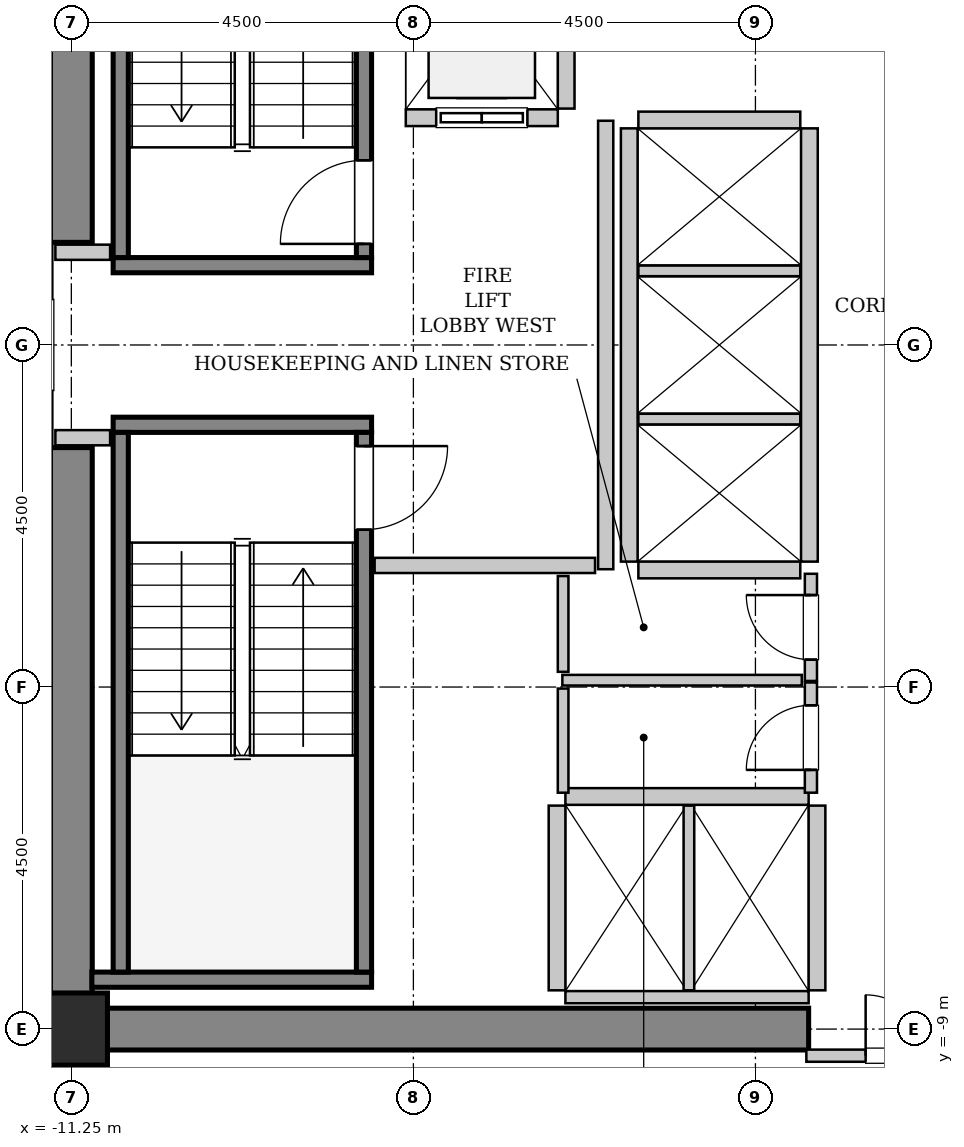
"""IFC4 building model, lengths in metres.
Left out: names, types, materials, properties, quantities, classifications, styles, units other than length and angle.
Written with IfcOpenShell. Run it as: python <this file> out.ifc"""

import sys

from ifc_helpers import new_model, si_unit, direction, frame, frame_2d, origin, origin_2d, place, context, subcontext, project, spatial, rectangle, hollow_rectangle, extrude, source, transform, mapped, element, fill, save


model = new_model("IFC4")
c1 = context("Model", 3, precision=1e-05, world=origin(), true_north=direction((0.0, 1.0)))
c2 = subcontext(c1, "Body", "Model", "MODEL_VIEW")
j1 = project(units=[si_unit("LENGTHUNIT", "METRE"), si_unit("PLANEANGLEUNIT", "RADIAN")], contexts=[c1])
p1 = place(None, origin())
s1 = spatial("IfcSite", under=j1, at=p1, CompositionType="ELEMENT")
p2 = place(p1, origin())
s2 = spatial("IfcBuilding", under=s1, at=p2, CompositionType="ELEMENT")
p3 = place(p2, frame((0.0, 0.0, 121.2)))
s3 = spatial("IfcBuildingStorey", under=s2, at=p3, CompositionType="ELEMENT", Elevation=121.2)
m1 = source(origin(), c2, "Body", "SweptSolid", [
    extrude(rectangle(XDim=9.975, YDim=0.55, at=frame_2d((4.987, 0.0))), origin(), (0.0, 0.0, 1.0), 3.8),
])
p4 = place(p3, frame((-11.525, -9.0, 0.0), z_axis=(0.0, 0.0, 1.0), x_axis=(1.0, 0.0, 0.0)))
e1 = element("IfcWall", 1, at=p4, inside=s3, PredefinedType="SHEAR", context=c2, shape_type="MappedRepresentation", body=[
    mapped(m1, transform((0.0, 0.0, 0.0), x_axis=(1.0, 0.0, 0.0), y_axis=(0.0, 1.0, 0.0), z_axis=(0.0, 0.0, 1.0), scale=1.0)),
])
m2 = source(origin(), c2, "Body", "SweptSolid", [
    extrude(rectangle(XDim=7.375, YDim=0.55, at=frame_2d((3.688, 0.0))), origin(), (0.0, 0.0, 1.0), 3.8),
])
for number, where, z_axis, x_axis in (
    (2, (-11.25, -8.725, 0.0), (0.0, 0.0, 1.0), (0.0, 1.0, 0.0)),
    (3, (-11.25, 1.35, 0.0), (0.0, 0.0, 1.0), (0.0, 1.0, 0.0)),
):
    element("IfcWall", number, at=place(p3, frame(where, z_axis=z_axis, x_axis=x_axis)), inside=s3, PredefinedType="SHEAR", context=c2, shape_type="MappedRepresentation", body=[
        mapped(m2, transform((0.0, 0.0, 0.0), x_axis=(1.0, 0.0, 0.0), y_axis=(0.0, 1.0, 0.0), z_axis=(0.0, 0.0, 1.0), scale=1.0)),
    ])
m3 = source(origin(), c2, "Body", "SweptSolid", [
    extrude(hollow_rectangle(XDim=0.95, YDim=0.95, WallThickness=0.045, InnerFilletRadius=0.045, OuterFilletRadius=0.09, at=origin_2d()), origin(), (0.0, 0.0, 1.0), 3.8),
])
p5 = place(p3, frame((-11.25, -9.0, 0.0), z_axis=(0.0, 0.0, 1.0), x_axis=(1.0, 0.0, 0.0)))
e4 = element("IfcColumn", 4, at=p5, inside=s3, PredefinedType="COLUMN", context=c2, shape_type="MappedRepresentation", body=[
    mapped(m3, transform((0.0, 0.0, 0.0), x_axis=(1.0, 0.0, 0.0), y_axis=(0.0, 1.0, 0.0), z_axis=(0.0, 0.0, 1.0), scale=1.0)),
])
m4 = source(origin(), c2, "Body", "SweptSolid", [
    extrude(rectangle(XDim=3.4, YDim=0.2, at=frame_2d((1.7, 0.0))), origin(), (0.0, 0.0, 1.0), 3.8),
])
p6 = place(p3, frame((-7.3, 1.05, 0.0), z_axis=(0.0, 0.0, 1.0), x_axis=(-1.0, 0.0, 0.0)))
e5 = element("IfcWall", 5, at=p6, inside=s3, PredefinedType="SOLIDWALL", context=c2, shape_type="MappedRepresentation", body=[
    mapped(m4, transform((0.0, 0.0, 0.0), x_axis=(1.0, 0.0, 0.0), y_axis=(0.0, 1.0, 0.0), z_axis=(0.0, 0.0, 1.0), scale=1.0)),
])
m5 = source(origin(), c2, "Body", "SweptSolid", [
    extrude(rectangle(XDim=7.1, YDim=0.2, at=frame_2d((3.55, 0.0))), origin(), (0.0, 0.0, 1.0), 3.8),
])
p7 = place(p3, frame((-7.4, 1.15, 0.0), z_axis=(0.0, 0.0, 1.0), x_axis=(0.0, 1.0, 0.0)))
e6 = element("IfcWall", 6, at=p7, inside=s3, PredefinedType="SOLIDWALL", context=c2, shape_type="MappedRepresentation", body=[
    mapped(m5, transform((0.0, 0.0, 0.0), x_axis=(1.0, 0.0, 0.0), y_axis=(0.0, 1.0, 0.0), z_axis=(0.0, 0.0, 1.0), scale=1.0)),
])
p8 = place(p7, frame((0.18, 0.0, 0.0)))
e7 = element("IfcOpeningElement", 7, at=p8, cuts=e6, PredefinedType="OPENING", context=c2, shape_type="SweptSolid", body=[
    extrude(rectangle(XDim=1.1, YDim=2.15, at=frame_2d((0.55, 1.075))), frame((0.0, 0.11, 0.0), z_axis=(0.0, -1.0, 0.0), x_axis=(1.0, 0.0, 0.0)), (0.0, 0.0, 1.0), 0.22),
])
p9 = place(p3, frame((-10.6, 1.15, 0.0), z_axis=(0.0, 0.0, 1.0), x_axis=(0.0, 1.0, 0.0)))
e8 = element("IfcWall", 8, at=p9, inside=s3, PredefinedType="SOLIDWALL", context=c2, shape_type="MappedRepresentation", body=[
    mapped(m5, transform((0.0, 0.0, 0.0), x_axis=(1.0, 0.0, 0.0), y_axis=(0.0, 1.0, 0.0), z_axis=(0.0, 0.0, 1.0), scale=1.0)),
])
p10 = place(p3, frame((-10.7, -1.05, 0.0), z_axis=(0.0, 0.0, 1.0), x_axis=(1.0, 0.0, 0.0)))
e9 = element("IfcWall", 9, at=p10, inside=s3, PredefinedType="SOLIDWALL", context=c2, shape_type="MappedRepresentation", body=[
    mapped(m4, transform((0.0, 0.0, 0.0), x_axis=(1.0, 0.0, 0.0), y_axis=(0.0, 1.0, 0.0), z_axis=(0.0, 0.0, 1.0), scale=1.0)),
])
m6 = source(origin(), c2, "Body", "SweptSolid", [
    extrude(rectangle(XDim=3.68, YDim=0.2, at=frame_2d((1.84, 0.0))), origin(), (0.0, 0.0, 1.0), 3.8),
])
p11 = place(p3, frame((-10.98, -8.35, 0.0), z_axis=(0.0, 0.0, 1.0), x_axis=(1.0, 0.0, 0.0)))
e10 = element("IfcWall", 10, at=p11, inside=s3, PredefinedType="SOLIDWALL", context=c2, shape_type="MappedRepresentation", body=[
    mapped(m6, transform((0.0, 0.0, 0.0), x_axis=(1.0, 0.0, 0.0), y_axis=(0.0, 1.0, 0.0), z_axis=(0.0, 0.0, 1.0), scale=1.0)),
])
p12 = place(p3, frame((-10.6, -1.15, 0.0), z_axis=(0.0, 0.0, 1.0), x_axis=(0.0, -1.0, 0.0)))
e11 = element("IfcWall", 11, at=p12, inside=s3, PredefinedType="SOLIDWALL", context=c2, shape_type="MappedRepresentation", body=[
    mapped(m5, transform((0.0, 0.0, 0.0), x_axis=(1.0, 0.0, 0.0), y_axis=(0.0, 1.0, 0.0), z_axis=(0.0, 0.0, 1.0), scale=1.0)),
])
p13 = place(p3, frame((-7.4, -1.15, 0.0), z_axis=(0.0, 0.0, 1.0), x_axis=(0.0, -1.0, 0.0)))
e12 = element("IfcWall", 12, at=p13, inside=s3, PredefinedType="SOLIDWALL", context=c2, shape_type="MappedRepresentation", body=[
    mapped(m5, transform((0.0, 0.0, 0.0), x_axis=(1.0, 0.0, 0.0), y_axis=(0.0, 1.0, 0.0), z_axis=(0.0, 0.0, 1.0), scale=1.0)),
])
p14 = place(p13, frame((0.18, 0.0, 0.0)))
e13 = element("IfcOpeningElement", 13, at=p14, cuts=e12, PredefinedType="OPENING", context=c2, shape_type="SweptSolid", body=[
    extrude(rectangle(XDim=1.1, YDim=2.15, at=frame_2d((0.55, 1.075))), frame((0.0, 0.11, 0.0), z_axis=(0.0, -1.0, 0.0), x_axis=(1.0, 0.0, 0.0)), (0.0, 0.0, 1.0), 0.22),
])
m7 = source(origin(), c2, "Body", "SweptSolid", [
    extrude(rectangle(XDim=2.0, YDim=0.22, at=frame_2d((1.0, 0.0))), origin(), (0.0, 0.0, 1.0), 3.535),
])
p15 = place(p3, frame((-6.85, 2.99, 0.0), z_axis=(0.0, 0.0, 1.0), x_axis=(1.0, 0.0, 0.0)))
e14 = element("IfcWall", 14, at=p15, inside=s3, PredefinedType="SOLIDWALL", context=c2, shape_type="MappedRepresentation", body=[
    mapped(m7, transform((0.0, 0.0, 0.0), x_axis=(1.0, 0.0, 0.0), y_axis=(0.0, 1.0, 0.0), z_axis=(0.0, 0.0, 1.0), scale=1.0)),
])
p16 = place(p15, frame((0.4, 0.0, 0.0)))
e15 = element("IfcOpeningElement", 15, at=p16, cuts=e14, PredefinedType="OPENING", context=c2, shape_type="SweptSolid", body=[
    extrude(rectangle(XDim=1.2, YDim=2.2, at=frame_2d((0.6, 1.1))), frame((0.0, 0.12, 0.0), z_axis=(0.0, -1.0, 0.0), x_axis=(1.0, 0.0, 0.0)), (0.0, 0.0, 1.0), 0.24),
])
m8 = source(origin(), c2, "Body", "SweptSolid", [
    extrude(rectangle(XDim=2.68, YDim=0.22, at=frame_2d((1.34, 0.0))), origin(), (0.0, 0.0, 1.0), 3.535),
])
p17 = place(p3, frame((-4.74, 3.11, 0.0), z_axis=(0.0, 0.0, 1.0), x_axis=(0.0, 1.0, 0.0)))
e16 = element("IfcWall", 16, at=p17, inside=s3, PredefinedType="SOLIDWALL", context=c2, shape_type="MappedRepresentation", body=[
    mapped(m8, transform((0.0, 0.0, 0.0), x_axis=(1.0, 0.0, 0.0), y_axis=(0.0, 1.0, 0.0), z_axis=(0.0, 0.0, 1.0), scale=1.0)),
])
m9 = source(origin(), c2, "Body", "SweptSolid", [
    extrude(rectangle(XDim=3.2, YDim=0.22, at=frame_2d((1.6, 0.0))), origin(), (0.0, 0.0, 1.0), 3.535),
])
p18 = place(p3, frame((-1.55, -5.94, 0.0), z_axis=(0.0, 0.0, 1.0), x_axis=(-1.0, 0.0, 0.0)))
e17 = element("IfcWall", 17, at=p18, inside=s3, PredefinedType="SOLIDWALL", context=c2, shape_type="MappedRepresentation", body=[
    mapped(m9, transform((0.0, 0.0, 0.0), x_axis=(1.0, 0.0, 0.0), y_axis=(0.0, 1.0, 0.0), z_axis=(0.0, 0.0, 1.0), scale=1.0)),
])
m10 = source(origin(), c2, "Body", "SweptSolid", [
    extrude(rectangle(XDim=3.2, YDim=0.16, at=frame_2d((1.6, 0.0))), origin(), (0.0, 0.0, 1.0), 2.425),
])
p19 = place(p3, frame((-4.75, -8.58, 0.0), z_axis=(0.0, 0.0, 1.0), x_axis=(1.0, 0.0, 0.0)))
e18 = element("IfcWall", 18, at=p19, inside=s3, PredefinedType="PARTITIONING", context=c2, shape_type="MappedRepresentation", body=[
    mapped(m10, transform((0.0, 0.0, 0.0), x_axis=(1.0, 0.0, 0.0), y_axis=(0.0, 1.0, 0.0), z_axis=(0.0, 0.0, 1.0), scale=1.0)),
])
m11 = source(origin(), c2, "Body", "SweptSolid", [
    extrude(rectangle(XDim=2.43, YDim=0.22, at=frame_2d((1.215, 0.0))), origin(), (0.0, 0.0, 1.0), 3.535),
])
p20 = place(p3, frame((-4.86, -6.06, 0.0), z_axis=(0.0, 0.0, 1.0), x_axis=(0.0, -1.0, 0.0)))
e19 = element("IfcWall", 19, at=p20, inside=s3, PredefinedType="SOLIDWALL", context=c2, shape_type="MappedRepresentation", body=[
    mapped(m11, transform((0.0, 0.0, 0.0), x_axis=(1.0, 0.0, 0.0), y_axis=(0.0, 1.0, 0.0), z_axis=(0.0, 0.0, 1.0), scale=1.0)),
])
m12 = source(origin(), c2, "Body", "SweptSolid", [
    extrude(rectangle(XDim=2.43, YDim=0.14, at=frame_2d((1.215, 0.0))), origin(), (0.0, 0.0, 1.0), 3.535),
])
p21 = place(p3, frame((-3.125, -8.49, 0.0), z_axis=(0.0, 0.0, 1.0), x_axis=(0.0, 1.0, 0.0)))
e20 = element("IfcWall", 20, at=p21, inside=s3, PredefinedType="PARTITIONING", context=c2, shape_type="MappedRepresentation", body=[
    mapped(m12, transform((0.0, 0.0, 0.0), x_axis=(1.0, 0.0, 0.0), y_axis=(0.0, 1.0, 0.0), z_axis=(0.0, 0.0, 1.0), scale=1.0)),
])
p22 = place(p3, frame((-1.44, -8.49, 0.0), z_axis=(0.0, 0.0, 1.0), x_axis=(0.0, 1.0, 0.0)))
e21 = element("IfcWall", 21, at=p22, inside=s3, PredefinedType="SOLIDWALL", context=c2, shape_type="MappedRepresentation", body=[
    mapped(m11, transform((0.0, 0.0, 0.0), x_axis=(1.0, 0.0, 0.0), y_axis=(0.0, 1.0, 0.0), z_axis=(0.0, 0.0, 1.0), scale=1.0)),
])
m13 = source(origin(), c2, "Body", "SweptSolid", [
    extrude(rectangle(XDim=5.7, YDim=0.22, at=frame_2d((2.85, 0.0))), origin(), (0.0, 0.0, 1.0), 3.535),
])
for number, where, z_axis, x_axis in (
    (22, (-1.54, -2.85, 0.0), (0.0, 0.0, 1.0), (0.0, 1.0, 0.0)),
    (23, (-3.91, 2.85, 0.0), (0.0, 0.0, 1.0), (0.0, -1.0, 0.0)),
):
    element("IfcWall", number, at=place(p3, frame(where, z_axis=z_axis, x_axis=x_axis)), inside=s3, PredefinedType="SOLIDWALL", context=c2, shape_type="MappedRepresentation", body=[
        mapped(m13, transform((0.0, 0.0, 0.0), x_axis=(1.0, 0.0, 0.0), y_axis=(0.0, 1.0, 0.0), z_axis=(0.0, 0.0, 1.0), scale=1.0)),
    ])
m14 = source(origin(), c2, "Body", "SweptSolid", [
    extrude(rectangle(XDim=2.13, YDim=0.22, at=frame_2d((1.065, 0.0))), origin(), (0.0, 0.0, 1.0), 3.535),
])
p23 = place(p3, frame((-3.79, -2.96, 0.0), z_axis=(0.0, 0.0, 1.0), x_axis=(1.0, 0.0, 0.0)))
e24 = element("IfcWall", 24, at=p23, inside=s3, PredefinedType="SOLIDWALL", context=c2, shape_type="MappedRepresentation", body=[
    mapped(m14, transform((0.0, 0.0, 0.0), x_axis=(1.0, 0.0, 0.0), y_axis=(0.0, 1.0, 0.0), z_axis=(0.0, 0.0, 1.0), scale=1.0)),
])
m15 = source(origin(), c2, "Body", "SweptSolid", [
    extrude(rectangle(XDim=2.13, YDim=0.14, at=frame_2d((1.065, 0.0))), origin(), (0.0, 0.0, 1.0), 3.535),
])
for number, where, z_axis, x_axis in (
    (25, (-3.79, -0.975, 0.0), (0.0, 0.0, 1.0), (1.0, 0.0, 0.0)),
    (26, (-3.79, 0.975, 0.0), (0.0, 0.0, 1.0), (1.0, 0.0, 0.0)),
):
    element("IfcWall", number, at=place(p3, frame(where, z_axis=z_axis, x_axis=x_axis)), inside=s3, PredefinedType="PARTITIONING", context=c2, shape_type="MappedRepresentation", body=[
        mapped(m15, transform((0.0, 0.0, 0.0), x_axis=(1.0, 0.0, 0.0), y_axis=(0.0, 1.0, 0.0), z_axis=(0.0, 0.0, 1.0), scale=1.0)),
    ])
p24 = place(p3, frame((-1.66, 2.96, 0.0), z_axis=(0.0, 0.0, 1.0), x_axis=(-1.0, 0.0, 0.0)))
e27 = element("IfcWall", 27, at=p24, inside=s3, PredefinedType="SOLIDWALL", context=c2, shape_type="MappedRepresentation", body=[
    mapped(m14, transform((0.0, 0.0, 0.0), x_axis=(1.0, 0.0, 0.0), y_axis=(0.0, 1.0, 0.0), z_axis=(0.0, 0.0, 1.0), scale=1.0)),
])
m16 = source(origin(), c2, "Body", "SweptSolid", [
    extrude(rectangle(XDim=5.9, YDim=0.2, at=frame_2d((2.95, 0.0))), origin(), (0.0, 0.0, 1.0), 3.535),
])
p25 = place(p3, frame((-4.22, -2.95, 0.0), z_axis=(0.0, 0.0, 1.0), x_axis=(0.0, 1.0, 0.0)))
e28 = element("IfcWall", 28, at=p25, inside=s3, PredefinedType="PARTITIONING", context=c2, shape_type="MappedRepresentation", body=[
    mapped(m16, transform((0.0, 0.0, 0.0), x_axis=(1.0, 0.0, 0.0), y_axis=(0.0, 1.0, 0.0), z_axis=(0.0, 0.0, 1.0), scale=1.0)),
])
m17 = source(origin(), c2, "Body", "SweptSolid", [
    extrude(rectangle(XDim=2.9, YDim=0.2, at=frame_2d((1.45, 0.0))), origin(), (0.0, 0.0, 1.0), 3.535),
])
p26 = place(p3, frame((-7.26, -2.9, 0.0), z_axis=(0.0, 0.0, 1.0), x_axis=(1.0, 0.0, 0.0)))
e29 = element("IfcWall", 29, at=p26, inside=s3, PredefinedType="PARTITIONING", context=c2, shape_type="MappedRepresentation", body=[
    mapped(m17, transform((0.0, 0.0, 0.0), x_axis=(1.0, 0.0, 0.0), y_axis=(0.0, 1.0, 0.0), z_axis=(0.0, 0.0, 1.0), scale=1.0)),
])
m18 = source(origin(), c2, "Body", "SweptSolid", [
    extrude(rectangle(XDim=0.72, YDim=0.2, at=frame_2d((0.36, 0.0))), origin(), (0.0, 0.0, 1.0), 3.535),
])
for number, where, z_axis, x_axis in (
    (30, (-11.46, 1.22, 0.0), (0.0, 0.0, 1.0), (1.0, 0.0, 0.0)),
    (31, (-11.46, -1.22, 0.0), (0.0, 0.0, 1.0), (1.0, 0.0, 0.0)),
):
    element("IfcWall", number, at=place(p3, frame(where, z_axis=z_axis, x_axis=x_axis)), inside=s3, PredefinedType="PARTITIONING", context=c2, shape_type="MappedRepresentation", body=[
        mapped(m18, transform((0.0, 0.0, 0.0), x_axis=(1.0, 0.0, 0.0), y_axis=(0.0, 1.0, 0.0), z_axis=(0.0, 0.0, 1.0), scale=1.0)),
    ])
m19 = source(origin(), c2, "Body", "SweptSolid", [
    extrude(rectangle(XDim=3.16, YDim=0.16, at=frame_2d((1.58, 0.0))), origin(), (0.0, 0.0, 1.0), 2.425),
])
p27 = place(p3, frame((-1.58, -9.35, 0.0), z_axis=(0.0, 0.0, 1.0), x_axis=(1.0, 0.0, 0.0)))
e32 = element("IfcWall", 32, at=p27, inside=s3, PredefinedType="PARTITIONING", context=c2, shape_type="MappedRepresentation", body=[
    mapped(m19, transform((0.0, 0.0, 0.0), x_axis=(1.0, 0.0, 0.0), y_axis=(0.0, 1.0, 0.0), z_axis=(0.0, 0.0, 1.0), scale=1.0)),
])
p28 = place(p27, frame((0.78, 0.0, 0.0)))
e33 = element("IfcOpeningElement", 33, at=p28, cuts=e32, PredefinedType="OPENING", context=c2, shape_type="SweptSolid", body=[
    extrude(rectangle(XDim=1.6, YDim=2.3, at=frame_2d((0.8, 1.15))), frame((0.0, 0.09, 0.0), z_axis=(0.0, -1.0, 0.0), x_axis=(1.0, 0.0, 0.0)), (0.0, 0.0, 1.0), 0.18),
])
m20 = source(origin(), c2, "Body", "SweptSolid", [
    extrude(rectangle(XDim=1.41, YDim=0.16, at=frame_2d((0.705, 0.0))), origin(), (0.0, 0.0, 1.0), 3.535),
])
p29 = place(p3, frame((-1.52, -4.42, 0.0), z_axis=(0.0, 0.0, 1.0), x_axis=(0.0, 1.0, 0.0)))
e34 = element("IfcWall", 34, at=p29, inside=s3, PredefinedType="PARTITIONING", context=c2, shape_type="MappedRepresentation", body=[
    mapped(m20, transform((0.0, 0.0, 0.0), x_axis=(1.0, 0.0, 0.0), y_axis=(0.0, 1.0, 0.0), z_axis=(0.0, 0.0, 1.0), scale=1.0)),
])
p30 = place(p29, frame((0.28, 0.0, 0.0)))
e35 = element("IfcOpeningElement", 35, at=p30, cuts=e34, PredefinedType="OPENING", context=c2, shape_type="SweptSolid", body=[
    extrude(rectangle(XDim=0.85, YDim=2.1, at=frame_2d((0.425, 1.05))), frame((0.0, 0.09, 0.0), z_axis=(0.0, -1.0, 0.0), x_axis=(1.0, 0.0, 0.0)), (0.0, 0.0, 1.0), 0.18),
])
m21 = source(origin(), c2, "Body", "SweptSolid", [
    extrude(rectangle(XDim=3.15, YDim=0.14, at=frame_2d((1.575, 0.0))), origin(), (0.0, 0.0, 1.0), 3.535),
])
p31 = place(p3, frame((-4.79, -4.41, 0.0), z_axis=(0.0, 0.0, 1.0), x_axis=(1.0, 0.0, 0.0)))
e36 = element("IfcWall", 36, at=p31, inside=s3, PredefinedType="PARTITIONING", context=c2, shape_type="MappedRepresentation", body=[
    mapped(m21, transform((0.0, 0.0, 0.0), x_axis=(1.0, 0.0, 0.0), y_axis=(0.0, 1.0, 0.0), z_axis=(0.0, 0.0, 1.0), scale=1.0)),
])
m22 = source(origin(), c2, "Body", "SweptSolid", [
    extrude(rectangle(XDim=1.26, YDim=0.14, at=frame_2d((0.63, 0.0))), origin(), (0.0, 0.0, 1.0), 3.535),
])
p32 = place(p3, frame((-4.78, -4.3, 0.0), z_axis=(0.0, 0.0, 1.0), x_axis=(0.0, 1.0, 0.0)))
e37 = element("IfcWall", 37, at=p32, inside=s3, PredefinedType="PARTITIONING", context=c2, shape_type="MappedRepresentation", body=[
    mapped(m22, transform((0.0, 0.0, 0.0), x_axis=(1.0, 0.0, 0.0), y_axis=(0.0, 1.0, 0.0), z_axis=(0.0, 0.0, 1.0), scale=1.0)),
])
m23 = source(origin(), c2, "Body", "SweptSolid", [
    extrude(rectangle(XDim=1.45, YDim=0.16, at=frame_2d((0.725, 0.0))), origin(), (0.0, 0.0, 1.0), 3.535),
])
p33 = place(p3, frame((-1.52, -5.89, 0.0), z_axis=(0.0, 0.0, 1.0), x_axis=(0.0, 1.0, 0.0)))
e38 = element("IfcWall", 38, at=p33, inside=s3, PredefinedType="PARTITIONING", context=c2, shape_type="MappedRepresentation", body=[
    mapped(m23, transform((0.0, 0.0, 0.0), x_axis=(1.0, 0.0, 0.0), y_axis=(0.0, 1.0, 0.0), z_axis=(0.0, 0.0, 1.0), scale=1.0)),
])
p34 = place(p33, frame((0.3, 0.0, 0.0)))
e39 = element("IfcOpeningElement", 39, at=p34, cuts=e38, PredefinedType="OPENING", context=c2, shape_type="SweptSolid", body=[
    extrude(rectangle(XDim=0.85, YDim=2.1, at=frame_2d((0.425, 1.05))), frame((0.0, 0.09, 0.0), z_axis=(0.0, -1.0, 0.0), x_axis=(1.0, 0.0, 0.0)), (0.0, 0.0, 1.0), 0.18),
])
m24 = source(origin(), c2, "Body", "SweptSolid", [
    extrude(rectangle(XDim=1.37, YDim=0.14, at=frame_2d((0.685, 0.0))), origin(), (0.0, 0.0, 1.0), 3.535),
])
p35 = place(p3, frame((-4.78, -5.89, 0.0), z_axis=(0.0, 0.0, 1.0), x_axis=(0.0, 1.0, 0.0)))
e40 = element("IfcWall", 40, at=p35, inside=s3, PredefinedType="PARTITIONING", context=c2, shape_type="MappedRepresentation", body=[
    mapped(m24, transform((0.0, 0.0, 0.0), x_axis=(1.0, 0.0, 0.0), y_axis=(0.0, 1.0, 0.0), z_axis=(0.0, 0.0, 1.0), scale=1.0)),
])
m25 = source(origin(), c2, "Body", "SweptSolid", [
    extrude(rectangle(XDim=1.1, YDim=2.15, at=frame_2d((0.55, 1.075))), frame((0.0, 0.025, 0.0), z_axis=(0.0, -1.0, 0.0), x_axis=(1.0, 0.0, 0.0)), (0.0, 0.0, 1.0), 0.05),
])
p36 = place(p8, origin())
e41 = element("IfcDoor", 41, at=p36, inside=s3, OperationType="SINGLE_SWING_LEFT", PredefinedType="DOOR", context=c2, shape_type="MappedRepresentation", body=[
    mapped(m25, transform((0.0, 0.0, 0.0), x_axis=(1.0, 0.0, 0.0), y_axis=(0.0, 1.0, 0.0), z_axis=(0.0, 0.0, 1.0), scale=1.0)),
])
fill(e7, e41)
p37 = place(p14, origin())
e42 = element("IfcDoor", 42, at=p37, inside=s3, OperationType="SINGLE_SWING_LEFT", PredefinedType="DOOR", context=c2, shape_type="MappedRepresentation", body=[
    mapped(m25, transform((0.0, 0.0, 0.0), x_axis=(1.0, 0.0, 0.0), y_axis=(0.0, 1.0, 0.0), z_axis=(0.0, 0.0, 1.0), scale=1.0)),
])
fill(e13, e42)
m26 = source(origin(), c2, "Body", "SweptSolid", [
    extrude(rectangle(XDim=1.2, YDim=2.2, at=frame_2d((0.6, 1.1))), frame((0.0, 0.025, 0.0), z_axis=(0.0, -1.0, 0.0), x_axis=(1.0, 0.0, 0.0)), (0.0, 0.0, 1.0), 0.05),
])
p38 = place(p16, origin())
e43 = element("IfcDoor", 43, at=p38, inside=s3, OperationType="SLIDING_TO_LEFT", PredefinedType="DOOR", context=c2, shape_type="MappedRepresentation", body=[
    mapped(m26, transform((0.0, 0.0, 0.0), x_axis=(1.0, 0.0, 0.0), y_axis=(0.0, 1.0, 0.0), z_axis=(0.0, 0.0, 1.0), scale=1.0)),
])
fill(e15, e43)
m27 = source(origin(), c2, "Body", "SweptSolid", [
    extrude(rectangle(XDim=1.6, YDim=2.3, at=frame_2d((0.8, 1.15))), frame((0.0, 0.025, 0.0), z_axis=(0.0, -1.0, 0.0), x_axis=(1.0, 0.0, 0.0)), (0.0, 0.0, 1.0), 0.05),
])
p39 = place(p28, origin())
e44 = element("IfcDoor", 44, at=p39, inside=s3, OperationType="DOUBLE_DOOR_SINGLE_SWING", PredefinedType="DOOR", context=c2, shape_type="MappedRepresentation", body=[
    mapped(m27, transform((0.0, 0.0, 0.0), x_axis=(1.0, 0.0, 0.0), y_axis=(0.0, 1.0, 0.0), z_axis=(0.0, 0.0, 1.0), scale=1.0)),
])
fill(e33, e44)
m28 = source(origin(), c2, "Body", "SweptSolid", [
    extrude(rectangle(XDim=0.85, YDim=2.1, at=frame_2d((0.425, 1.05))), frame((0.0, 0.025, 0.0), z_axis=(0.0, -1.0, 0.0), x_axis=(1.0, 0.0, 0.0)), (0.0, 0.0, 1.0), 0.05),
])
p40 = place(p30, origin())
e45 = element("IfcDoor", 45, at=p40, inside=s3, OperationType="SINGLE_SWING_RIGHT", PredefinedType="DOOR", context=c2, shape_type="MappedRepresentation", body=[
    mapped(m28, transform((0.0, 0.0, 0.0), x_axis=(1.0, 0.0, 0.0), y_axis=(0.0, 1.0, 0.0), z_axis=(0.0, 0.0, 1.0), scale=1.0)),
])
fill(e35, e45)
p41 = place(p34, origin())
e46 = element("IfcDoor", 46, at=p41, inside=s3, OperationType="SINGLE_SWING_LEFT", PredefinedType="DOOR", context=c2, shape_type="MappedRepresentation", body=[
    mapped(m28, transform((0.0, 0.0, 0.0), x_axis=(1.0, 0.0, 0.0), y_axis=(0.0, 1.0, 0.0), z_axis=(0.0, 0.0, 1.0), scale=1.0)),
])
fill(e39, e46)
save(model, sys.argv[1])
